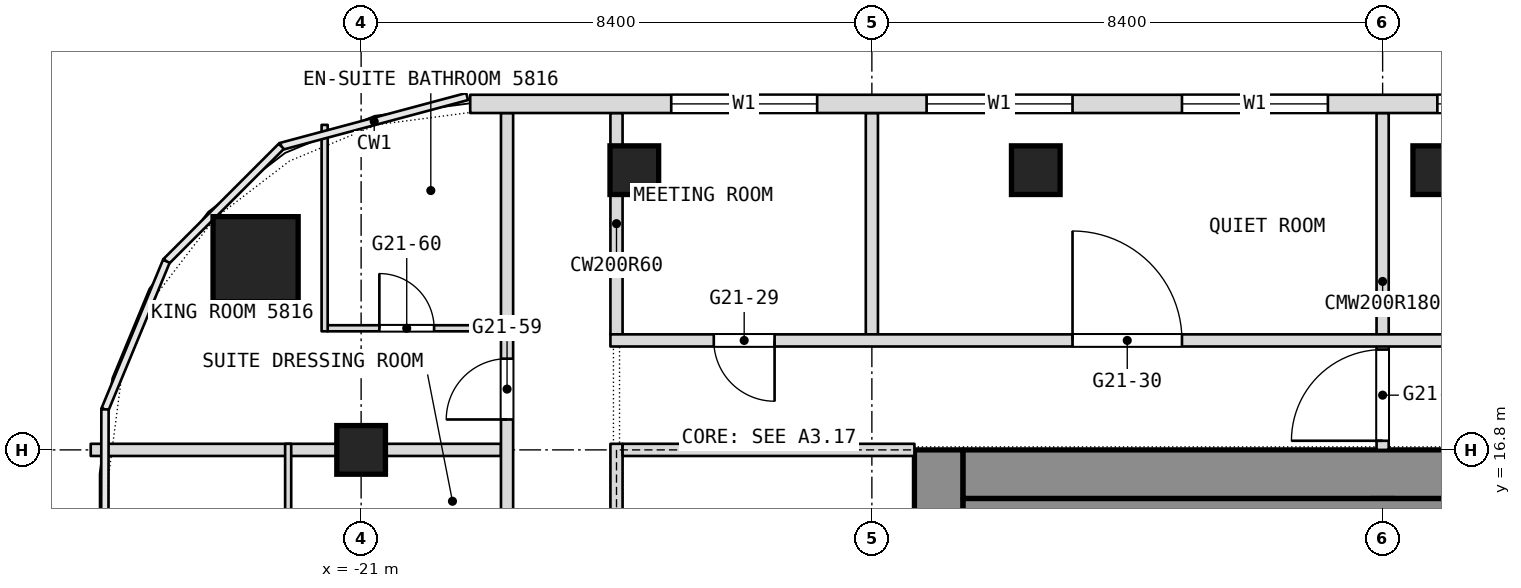
"""IFC4 building model, lengths in metres.
Left out: names, types, materials, properties, quantities, classifications, styles, units other than length and angle.
Written with IfcOpenShell. Run it as: python <this file> out.ifc"""

import sys

from ifc_helpers import new_model, si_unit, direction, frame, frame_2d, origin, origin_2d, place, context, subcontext, project, spatial, rectangle, extrude, element, fill, save


model = new_model("IFC4")
c1 = context("Model", 3, precision=1e-05, world=origin(), true_north=direction((0.0, 1.0)))
c2 = subcontext(c1, "Body", "Model", "MODEL_VIEW")
j1 = project(units=[si_unit("LENGTHUNIT", "METRE"), si_unit("PLANEANGLEUNIT", "RADIAN")], contexts=[c1])
p1 = place(None, origin())
s1 = spatial("IfcSite", under=j1, at=p1, CompositionType="ELEMENT")
p2 = place(p1, origin())
s2 = spatial("IfcBuilding", under=s1, at=p2, CompositionType="ELEMENT")
p3 = place(p2, frame((0.0, 0.0, 245.3)))
s3 = spatial("IfcBuildingStorey", under=s2, at=p3, CompositionType="ELEMENT", Elevation=245.3)
p4 = place(p3, frame((-11.5, 0.0, 0.0), z_axis=(0.0, 0.0, 1.0), x_axis=(0.0, 1.0, 0.0)))
e1 = element("IfcWall", 1, at=p4, inside=s3, PredefinedType="SHEAR", context=c2, shape_type="SweptSolid", body=[
    extrude(rectangle(XDim=16.8, YDim=0.8, at=frame_2d((8.4, 0.0))), origin(), (0.0, 0.0, 1.0), 3.6),
])
p5 = place(p4, frame((3.6, 0.0, 0.0)))
e2 = element("IfcOpeningElement", 2, at=p5, cuts=e1, PredefinedType="OPENING", context=c2, shape_type="SweptSolid", body=[
    extrude(rectangle(XDim=0.9, YDim=2.1, at=frame_2d((0.45, 1.05))), frame((0.0, 0.4, 0.0), z_axis=(0.0, -1.0, 0.0), x_axis=(1.0, 0.0, 0.0)), (0.0, 0.0, 1.0), 0.8),
])
p6 = place(p4, frame((6.825, 0.0, 0.0)))
e3 = element("IfcOpeningElement", 3, at=p6, cuts=e1, PredefinedType="OPENING", context=c2, shape_type="SweptSolid", body=[
    extrude(rectangle(XDim=1.2, YDim=2.1, at=frame_2d((0.6, 1.05))), frame((0.0, 0.4, 0.0), z_axis=(0.0, -1.0, 0.0), x_axis=(1.0, 0.0, 0.0)), (0.0, 0.0, 1.0), 0.8),
])
p7 = place(p4, frame((14.062, 0.0, 0.0)))
e4 = element("IfcOpeningElement", 4, at=p7, cuts=e1, PredefinedType="OPENING", context=c2, shape_type="SweptSolid", body=[
    extrude(rectangle(XDim=0.9, YDim=2.1, at=frame_2d((0.45, 1.05))), frame((0.0, 0.4, 0.0), z_axis=(0.0, -1.0, 0.0), x_axis=(1.0, 0.0, 0.0)), (0.0, 0.0, 1.0), 0.8),
])
p8 = place(p4, frame((11.438, 0.0, 0.0)))
e5 = element("IfcOpeningElement", 5, at=p8, cuts=e1, PredefinedType="OPENING", context=c2, shape_type="SweptSolid", body=[
    extrude(rectangle(XDim=0.9, YDim=2.1, at=frame_2d((0.45, 1.05))), frame((0.0, 0.4, 0.0), z_axis=(0.0, -1.0, 0.0), x_axis=(1.0, 0.0, 0.0)), (0.0, 0.0, 1.0), 0.8),
])
p9 = place(p4, frame((8.775, 0.0, 0.0)))
e6 = element("IfcOpeningElement", 6, at=p9, cuts=e1, PredefinedType="OPENING", context=c2, shape_type="SweptSolid", body=[
    extrude(rectangle(XDim=1.2, YDim=2.1, at=frame_2d((0.6, 1.05))), frame((0.0, 0.4, 0.0), z_axis=(0.0, -1.0, 0.0), x_axis=(1.0, 0.0, 0.0)), (0.0, 0.0, 1.0), 0.8),
])
p10 = place(p3, frame((-11.1, 16.4, 0.0), z_axis=(0.0, 0.0, 1.0), x_axis=(1.0, 0.0, 0.0)))
e7 = element("IfcWall", 7, at=p10, inside=s3, PredefinedType="SHEAR", context=c2, shape_type="SweptSolid", body=[
    extrude(rectangle(XDim=22.2, YDim=0.8, at=frame_2d((11.1, 0.0))), origin(), (0.0, 0.0, 1.0), 3.6),
])
p11 = place(p3, frame((-4.2, 0.8, 0.0), z_axis=(0.0, 0.0, 1.0), x_axis=(0.0, 1.0, 0.0)))
e8 = element("IfcWall", 8, at=p11, inside=s3, PredefinedType="SHEAR", context=c2, shape_type="SweptSolid", body=[
    extrude(rectangle(XDim=15.2, YDim=0.4, at=frame_2d((7.6, 0.0))), origin(), (0.0, 0.0, 1.0), 3.6),
])
p12 = place(p11, frame((8.5, 0.0, 0.0)))
e9 = element("IfcOpeningElement", 9, at=p12, cuts=e8, PredefinedType="OPENING", context=c2, shape_type="SweptSolid", body=[
    extrude(rectangle(XDim=1.2, YDim=2.1, at=frame_2d((0.6, 1.05))), frame((0.0, 0.2, 0.0), z_axis=(0.0, -1.0, 0.0), x_axis=(1.0, 0.0, 0.0)), (0.0, 0.0, 1.0), 0.4),
])
p13 = place(p3, frame((-22.736, 19.936, 0.0), z_axis=(0.0, 0.0, 1.0), x_axis=(1.0, 0.0, 0.0)))
e10 = element("IfcColumn", 10, at=p13, inside=s3, PredefinedType="COLUMN", context=c2, shape_type="SweptSolid", body=[
    extrude(rectangle(XDim=1.4, YDim=1.4, at=origin_2d()), origin(), (0.0, 0.0, 1.0), 3.6),
])
for number, where, z_axis, x_axis in (
    (11, (-21.0, 16.8, 0.0), (0.0, 0.0, 1.0), (1.0, 0.0, 0.0)),
    (12, (-16.507, 21.4, 0.0), (0.0, 0.0, 1.0), (1.0, 0.0, 0.0)),
    (13, (-9.904, 21.4, 0.0), (0.0, 0.0, 1.0), (1.0, 0.0, 0.0)),
    (14, (-3.302, 21.4, 0.0), (0.0, 0.0, 1.0), (1.0, 0.0, 0.0)),
):
    element("IfcColumn", number, at=place(p3, frame(where, z_axis=z_axis, x_axis=x_axis)), inside=s3, PredefinedType="COLUMN", context=c2, shape_type="SweptSolid", body=[
        extrude(rectangle(XDim=0.8, YDim=0.8, at=origin_2d()), origin(), (0.0, 0.0, 1.0), 3.6),
    ])
p14 = place(p3, frame((-4.2, 16.8, 0.0), z_axis=(0.0, 0.0, 1.0), x_axis=(0.0, 1.0, 0.0)))
e15 = element("IfcWall", 15, at=p14, inside=s3, PredefinedType="PARTITIONING", context=c2, shape_type="SweptSolid", body=[
    extrude(rectangle(XDim=5.54, YDim=0.2, at=frame_2d((2.77, 0.0))), origin(), (0.0, 0.0, 1.0), 3.34),
])
p15 = place(p14, frame((0.15, 0.0, 0.0)))
e16 = element("IfcOpeningElement", 16, at=p15, cuts=e15, PredefinedType="OPENING", context=c2, shape_type="SweptSolid", body=[
    extrude(rectangle(XDim=1.5, YDim=2.1, at=frame_2d((0.75, 1.05))), frame((0.0, 0.1, 0.0), z_axis=(0.0, -1.0, 0.0), x_axis=(1.0, 0.0, 0.0)), (0.0, 0.0, 1.0), 0.2),
])
for number, where, z_axis, x_axis in (
    (17, (-12.6, 18.7, 0.0), (0.0, 0.0, 1.0), (0.0, 1.0, 0.0)),
    (18, (-16.8, 18.7, 0.0), (0.0, 0.0, 1.0), (0.0, 1.0, 0.0)),
):
    element("IfcWall", number, at=place(p3, frame(where, z_axis=z_axis, x_axis=x_axis)), inside=s3, PredefinedType="PARTITIONING", context=c2, shape_type="SweptSolid", body=[
        extrude(rectangle(XDim=3.64, YDim=0.2, at=frame_2d((1.82, 0.0))), origin(), (0.0, 0.0, 1.0), 3.34),
    ])
p16 = place(p3, frame((-25.447, 16.8, 0.0), z_axis=(0.0, 0.0, 1.0), x_axis=(1.0, 0.0, 0.0)))
e19 = element("IfcWall", 19, at=p16, inside=s3, PredefinedType="PARTITIONING", context=c2, shape_type="SweptSolid", body=[
    extrude(rectangle(XDim=6.747, YDim=0.2, at=frame_2d((3.374, 0.0))), origin(), (0.0, 0.0, 1.0), 2.94),
])
p17 = place(p3, frame((-18.6, -26.751, 0.0), z_axis=(0.0, 0.0, 1.0), x_axis=(0.0, 1.0, 0.0)))
e20 = element("IfcWall", 20, at=p17, inside=s3, PredefinedType="PARTITIONING", context=c2, shape_type="SweptSolid", body=[
    extrude(rectangle(XDim=49.091, YDim=0.2, at=frame_2d((24.545, 0.0))), origin(), (0.0, 0.0, 1.0), 3.34),
])
p18 = place(p17, frame((4.576, 0.0, 0.0)))
e21 = element("IfcOpeningElement", 21, at=p18, cuts=e20, PredefinedType="OPENING", context=c2, shape_type="SweptSolid", body=[
    extrude(rectangle(XDim=1.1, YDim=2.1, at=frame_2d((0.55, 1.05))), frame((0.0, 0.1, 0.0), z_axis=(0.0, -1.0, 0.0), x_axis=(1.0, 0.0, 0.0)), (0.0, 0.0, 1.0), 0.2),
])
p19 = place(p17, frame((13.551, 0.0, 0.0)))
e22 = element("IfcOpeningElement", 22, at=p19, cuts=e20, PredefinedType="OPENING", context=c2, shape_type="SweptSolid", body=[
    extrude(rectangle(XDim=1.1, YDim=2.1, at=frame_2d((0.55, 1.05))), frame((0.0, 0.1, 0.0), z_axis=(0.0, -1.0, 0.0), x_axis=(1.0, 0.0, 0.0)), (0.0, 0.0, 1.0), 0.2),
])
p20 = place(p17, frame((22.051, 0.0, 0.0)))
e23 = element("IfcOpeningElement", 23, at=p20, cuts=e20, PredefinedType="OPENING", context=c2, shape_type="SweptSolid", body=[
    extrude(rectangle(XDim=1.1, YDim=2.1, at=frame_2d((0.55, 1.05))), frame((0.0, 0.1, 0.0), z_axis=(0.0, -1.0, 0.0), x_axis=(1.0, 0.0, 0.0)), (0.0, 0.0, 1.0), 0.2),
])
p21 = place(p17, frame((30.351, 0.0, 0.0)))
e24 = element("IfcOpeningElement", 24, at=p21, cuts=e20, PredefinedType="OPENING", context=c2, shape_type="SweptSolid", body=[
    extrude(rectangle(XDim=1.1, YDim=2.1, at=frame_2d((0.55, 1.05))), frame((0.0, 0.1, 0.0), z_axis=(0.0, -1.0, 0.0), x_axis=(1.0, 0.0, 0.0)), (0.0, 0.0, 1.0), 0.2),
])
p22 = place(p17, frame((38.851, 0.0, 0.0)))
e25 = element("IfcOpeningElement", 25, at=p22, cuts=e20, PredefinedType="OPENING", context=c2, shape_type="SweptSolid", body=[
    extrude(rectangle(XDim=1.1, YDim=2.1, at=frame_2d((0.55, 1.05))), frame((0.0, 0.1, 0.0), z_axis=(0.0, -1.0, 0.0), x_axis=(1.0, 0.0, 0.0)), (0.0, 0.0, 1.0), 0.2),
])
p23 = place(p17, frame((44.051, 0.0, 0.0)))
e26 = element("IfcOpeningElement", 26, at=p23, cuts=e20, PredefinedType="OPENING", context=c2, shape_type="SweptSolid", body=[
    extrude(rectangle(XDim=1.0, YDim=2.1, at=frame_2d((0.5, 1.05))), frame((0.0, 0.1, 0.0), z_axis=(0.0, -1.0, 0.0), x_axis=(1.0, 0.0, 0.0)), (0.0, 0.0, 1.0), 0.2),
])
p24 = place(p3, frame((-16.9, 18.6, 0.0), z_axis=(0.0, 0.0, 1.0), x_axis=(1.0, 0.0, 0.0)))
e27 = element("IfcWall", 27, at=p24, inside=s3, PredefinedType="PARTITIONING", context=c2, shape_type="SweptSolid", body=[
    extrude(rectangle(XDim=33.8, YDim=0.2, at=frame_2d((16.9, 0.0))), origin(), (0.0, 0.0, 1.0), 3.34),
])
p25 = place(p24, frame((1.7, 0.0, 0.0)))
e28 = element("IfcOpeningElement", 28, at=p25, cuts=e27, PredefinedType="OPENING", context=c2, shape_type="SweptSolid", body=[
    extrude(rectangle(XDim=1.0, YDim=2.1, at=frame_2d((0.5, 1.05))), frame((0.0, 0.1, 0.0), z_axis=(0.0, -1.0, 0.0), x_axis=(1.0, 0.0, 0.0)), (0.0, 0.0, 1.0), 0.2),
])
p26 = place(p24, frame((7.6, 0.0, 0.0)))
e29 = element("IfcOpeningElement", 29, at=p26, cuts=e27, PredefinedType="OPENING", context=c2, shape_type="SweptSolid", body=[
    extrude(rectangle(XDim=1.8, YDim=2.1, at=frame_2d((0.9, 1.05))), frame((0.0, 0.1, 0.0), z_axis=(0.0, -1.0, 0.0), x_axis=(1.0, 0.0, 0.0)), (0.0, 0.0, 1.0), 0.2),
])
p27 = place(p24, frame((16.0, 0.0, 0.0)))
e30 = element("IfcOpeningElement", 30, at=p27, cuts=e27, PredefinedType="OPENING", context=c2, shape_type="SweptSolid", body=[
    extrude(rectangle(XDim=1.8, YDim=2.1, at=frame_2d((0.9, 1.05))), frame((0.0, 0.1, 0.0), z_axis=(0.0, -1.0, 0.0), x_axis=(1.0, 0.0, 0.0)), (0.0, 0.0, 1.0), 0.2),
])
p28 = place(p24, frame((31.1, 0.0, 0.0)))
e31 = element("IfcOpeningElement", 31, at=p28, cuts=e27, PredefinedType="OPENING", context=c2, shape_type="SweptSolid", body=[
    extrude(rectangle(XDim=1.0, YDim=2.1, at=frame_2d((0.5, 1.05))), frame((0.0, 0.1, 0.0), z_axis=(0.0, -1.0, 0.0), x_axis=(1.0, 0.0, 0.0)), (0.0, 0.0, 1.0), 0.2),
])
p29 = place(p24, frame((22.7, 0.0, 0.0)))
e32 = element("IfcOpeningElement", 32, at=p29, cuts=e27, PredefinedType="OPENING", context=c2, shape_type="SweptSolid", body=[
    extrude(rectangle(XDim=1.0, YDim=2.1, at=frame_2d((0.5, 1.05))), frame((0.0, 0.1, 0.0), z_axis=(0.0, -1.0, 0.0), x_axis=(1.0, 0.0, 0.0)), (0.0, 0.0, 1.0), 0.2),
])
p30 = place(p24, frame((26.9, 0.0, 0.0)))
e33 = element("IfcOpeningElement", 33, at=p30, cuts=e27, PredefinedType="OPENING", context=c2, shape_type="SweptSolid", body=[
    extrude(rectangle(XDim=1.0, YDim=2.1, at=frame_2d((0.5, 1.05))), frame((0.0, 0.1, 0.0), z_axis=(0.0, -1.0, 0.0), x_axis=(1.0, 0.0, 0.0)), (0.0, 0.0, 1.0), 0.2),
])
p31 = place(p3, frame((-21.55, 18.8, 0.0), z_axis=(0.0, 0.0, 1.0), x_axis=(1.0, 0.0, 0.0)))
e34 = element("IfcWall", 34, at=p31, inside=s3, PredefinedType="PARTITIONING", context=c2, shape_type="SweptSolid", body=[
    extrude(rectangle(XDim=2.85, YDim=0.1, at=frame_2d((1.425, 0.0))), origin(), (0.0, 0.0, 1.0), 3.34),
])
p32 = place(p31, frame((0.85, 0.0, 0.0)))
e35 = element("IfcOpeningElement", 35, at=p32, cuts=e34, PredefinedType="OPENING", context=c2, shape_type="SweptSolid", body=[
    extrude(rectangle(XDim=0.9, YDim=2.1, at=frame_2d((0.45, 1.05))), frame((0.0, 0.05, 0.0), z_axis=(0.0, -1.0, 0.0), x_axis=(1.0, 0.0, 0.0)), (0.0, 0.0, 1.0), 0.1),
])
p33 = place(p3, frame((-21.6, 18.75, 0.0), z_axis=(0.0, 0.0, 1.0), x_axis=(0.0, 1.0, 0.0)))
e36 = element("IfcWall", 36, at=p33, inside=s3, PredefinedType="PARTITIONING", context=c2, shape_type="SweptSolid", body=[
    extrude(rectangle(XDim=3.395, YDim=0.1, at=frame_2d((1.698, 0.0))), origin(), (0.0, 0.0, 1.0), 3.34),
])
p34 = place(p3, frame((-22.2, 14.35, 0.0), z_axis=(0.0, 0.0, 1.0), x_axis=(0.0, 1.0, 0.0)))
e37 = element("IfcWall", 37, at=p34, inside=s3, PredefinedType="PARTITIONING", context=c2, shape_type="SweptSolid", body=[
    extrude(rectangle(XDim=2.55, YDim=0.1, at=frame_2d((1.275, 0.0))), origin(), (0.0, 0.0, 1.0), 3.34),
])
p35 = place(p3, frame((19.206, 22.49, 0.0), z_axis=(0.0, 0.0, 1.0), x_axis=(-1.0, 0.0, 0.0)))
e38 = element("IfcWall", 38, at=p35, inside=s3, PredefinedType="NOTDEFINED", context=c2, shape_type="SweptSolid", body=[
    extrude(rectangle(XDim=38.412, YDim=0.3, at=frame_2d((19.206, 0.0))), origin(), (0.0, 0.0, 1.0), 3.6),
])
p36 = place(p35, frame((3.306, 0.0, 0.9)))
e39 = element("IfcOpeningElement", 39, at=p36, cuts=e38, PredefinedType="OPENING", context=c2, shape_type="SweptSolid", body=[
    extrude(rectangle(XDim=2.4, YDim=2.1, at=frame_2d((1.2, 1.05))), frame((0.0, 0.15, 0.0), z_axis=(0.0, -1.0, 0.0), x_axis=(1.0, 0.0, 0.0)), (0.0, 0.0, 1.0), 0.3),
])
p37 = place(p35, frame((7.506, 0.0, 0.9)))
e40 = element("IfcOpeningElement", 40, at=p37, cuts=e38, PredefinedType="OPENING", context=c2, shape_type="SweptSolid", body=[
    extrude(rectangle(XDim=2.4, YDim=2.1, at=frame_2d((1.2, 1.05))), frame((0.0, 0.15, 0.0), z_axis=(0.0, -1.0, 0.0), x_axis=(1.0, 0.0, 0.0)), (0.0, 0.0, 1.0), 0.3),
])
p38 = place(p35, frame((11.706, 0.0, 0.9)))
e41 = element("IfcOpeningElement", 41, at=p38, cuts=e38, PredefinedType="OPENING", context=c2, shape_type="SweptSolid", body=[
    extrude(rectangle(XDim=2.4, YDim=2.1, at=frame_2d((1.2, 1.05))), frame((0.0, 0.15, 0.0), z_axis=(0.0, -1.0, 0.0), x_axis=(1.0, 0.0, 0.0)), (0.0, 0.0, 1.0), 0.3),
])
p39 = place(p35, frame((15.906, 0.0, 0.9)))
e42 = element("IfcOpeningElement", 42, at=p39, cuts=e38, PredefinedType="OPENING", context=c2, shape_type="SweptSolid", body=[
    extrude(rectangle(XDim=2.4, YDim=2.1, at=frame_2d((1.2, 1.05))), frame((0.0, 0.15, 0.0), z_axis=(0.0, -1.0, 0.0), x_axis=(1.0, 0.0, 0.0)), (0.0, 0.0, 1.0), 0.3),
])
p40 = place(p35, frame((20.106, 0.0, 0.9)))
e43 = element("IfcOpeningElement", 43, at=p40, cuts=e38, PredefinedType="OPENING", context=c2, shape_type="SweptSolid", body=[
    extrude(rectangle(XDim=2.4, YDim=2.1, at=frame_2d((1.2, 1.05))), frame((0.0, 0.15, 0.0), z_axis=(0.0, -1.0, 0.0), x_axis=(1.0, 0.0, 0.0)), (0.0, 0.0, 1.0), 0.3),
])
p41 = place(p35, frame((24.306, 0.0, 0.9)))
e44 = element("IfcOpeningElement", 44, at=p41, cuts=e38, PredefinedType="OPENING", context=c2, shape_type="SweptSolid", body=[
    extrude(rectangle(XDim=2.4, YDim=2.1, at=frame_2d((1.2, 1.05))), frame((0.0, 0.15, 0.0), z_axis=(0.0, -1.0, 0.0), x_axis=(1.0, 0.0, 0.0)), (0.0, 0.0, 1.0), 0.3),
])
p42 = place(p35, frame((28.506, 0.0, 0.9)))
e45 = element("IfcOpeningElement", 45, at=p42, cuts=e38, PredefinedType="OPENING", context=c2, shape_type="SweptSolid", body=[
    extrude(rectangle(XDim=2.4, YDim=2.1, at=frame_2d((1.2, 1.05))), frame((0.0, 0.15, 0.0), z_axis=(0.0, -1.0, 0.0), x_axis=(1.0, 0.0, 0.0)), (0.0, 0.0, 1.0), 0.3),
])
p43 = place(p35, frame((32.706, 0.0, 0.9)))
e46 = element("IfcOpeningElement", 46, at=p43, cuts=e38, PredefinedType="OPENING", context=c2, shape_type="SweptSolid", body=[
    extrude(rectangle(XDim=2.4, YDim=2.1, at=frame_2d((1.2, 1.05))), frame((0.0, 0.15, 0.0), z_axis=(0.0, -1.0, 0.0), x_axis=(1.0, 0.0, 0.0)), (0.0, 0.0, 1.0), 0.3),
])
p44 = place(p3, frame((-11.1, 15.65, 0.0), z_axis=(0.0, 0.0, 1.0), x_axis=(1.0, 0.0, 0.0)))
e47 = element("IfcWall", 47, at=p44, inside=s3, PredefinedType="PARTITIONING", context=c2, shape_type="SweptSolid", body=[
    extrude(rectangle(XDim=22.2, YDim=0.7, at=frame_2d((11.1, 0.0))), origin(), (0.0, 0.0, 1.0), 3.34),
])
p45 = place(p3, frame((-16.8, -0.1, 0.0), z_axis=(0.0, 0.0, 1.0), x_axis=(0.0, 1.0, 0.0)))
e48 = element("IfcWall", 48, at=p45, inside=s3, PredefinedType="PARTITIONING", context=c2, shape_type="SweptSolid", body=[
    extrude(rectangle(XDim=17.0, YDim=0.2, at=frame_2d((8.5, 0.0))), origin(), (0.0, 0.0, 1.0), 3.34),
])
p46 = place(p45, frame((2.2, 0.0, 0.0)))
e49 = element("IfcOpeningElement", 49, at=p46, cuts=e48, PredefinedType="OPENING", context=c2, shape_type="SweptSolid", body=[
    extrude(rectangle(XDim=1.8, YDim=2.1, at=frame_2d((0.9, 1.05))), frame((0.0, 0.1, 0.0), z_axis=(0.0, -1.0, 0.0), x_axis=(1.0, 0.0, 0.0)), (0.0, 0.0, 1.0), 0.2),
])
p47 = place(p45, frame((13.0, 0.0, 0.0)))
e50 = element("IfcOpeningElement", 50, at=p47, cuts=e48, PredefinedType="OPENING", context=c2, shape_type="SweptSolid", body=[
    extrude(rectangle(XDim=1.8, YDim=2.1, at=frame_2d((0.9, 1.05))), frame((0.0, 0.1, 0.0), z_axis=(0.0, -1.0, 0.0), x_axis=(1.0, 0.0, 0.0)), (0.0, 0.0, 1.0), 0.2),
])
p48 = place(p3, frame((-16.7, 16.8, 0.0), z_axis=(0.0, 0.0, 1.0), x_axis=(1.0, 0.0, 0.0)))
e51 = element("IfcWall", 51, at=p48, inside=s3, PredefinedType="PARTITIONING", context=c2, shape_type="SweptSolid", body=[
    extrude(rectangle(XDim=4.8, YDim=0.2, at=frame_2d((2.4, 0.0))), origin(), (0.0, 0.0, 1.0), 2.94),
])
p49 = place(p23, origin())
e52 = element("IfcDoor", 52, at=p49, inside=s3, OperationType="SINGLE_SWING_RIGHT", PredefinedType="DOOR", context=c2, shape_type="SweptSolid", body=[
    extrude(rectangle(XDim=1.0, YDim=2.1, at=frame_2d((0.5, 1.05))), frame((0.0, 0.025, 0.0), z_axis=(0.0, -1.0, 0.0), x_axis=(1.0, 0.0, 0.0)), (0.0, 0.0, 1.0), 0.05),
])
fill(e26, e52)
p50 = place(p25, origin())
e53 = element("IfcDoor", 53, at=p50, inside=s3, OperationType="SINGLE_SWING_LEFT", PredefinedType="DOOR", context=c2, shape_type="SweptSolid", body=[
    extrude(rectangle(XDim=1.0, YDim=2.1, at=frame_2d((0.5, 1.05))), frame((0.0, 0.025, 0.0), z_axis=(0.0, -1.0, 0.0), x_axis=(1.0, 0.0, 0.0)), (0.0, 0.0, 1.0), 0.05),
])
fill(e28, e53)
p51 = place(p26, origin())
e54 = element("IfcDoor", 54, at=p51, inside=s3, OperationType="DOUBLE_DOOR_SINGLE_SWING", PredefinedType="DOOR", context=c2, shape_type="SweptSolid", body=[
    extrude(rectangle(XDim=1.8, YDim=2.1, at=frame_2d((0.9, 1.05))), frame((0.0, 0.025, 0.0), z_axis=(0.0, -1.0, 0.0), x_axis=(1.0, 0.0, 0.0)), (0.0, 0.0, 1.0), 0.05),
])
fill(e29, e54)
p52 = place(p32, origin())
e55 = element("IfcDoor", 55, at=p52, inside=s3, OperationType="SINGLE_SWING_LEFT", PredefinedType="DOOR", context=c2, shape_type="SweptSolid", body=[
    extrude(rectangle(XDim=0.9, YDim=2.1, at=frame_2d((0.45, 1.05))), frame((0.0, 0.025, 0.0), z_axis=(0.0, -1.0, 0.0), x_axis=(1.0, 0.0, 0.0)), (0.0, 0.0, 1.0), 0.05),
])
fill(e35, e55)
p53 = place(p40, origin())
e56 = element("IfcWindow", 56, at=p53, inside=s3, PartitioningType="SINGLE_PANEL", PredefinedType="WINDOW", context=c2, shape_type="SweptSolid", body=[
    extrude(rectangle(XDim=2.4, YDim=2.1, at=frame_2d((1.2, 1.05))), frame((0.0, 0.03, 0.0), z_axis=(0.0, -1.0, 0.0), x_axis=(1.0, 0.0, 0.0)), (0.0, 0.0, 1.0), 0.06),
])
fill(e43, e56)
p54 = place(p41, origin())
e57 = element("IfcWindow", 57, at=p54, inside=s3, PartitioningType="SINGLE_PANEL", PredefinedType="WINDOW", context=c2, shape_type="SweptSolid", body=[
    extrude(rectangle(XDim=2.4, YDim=2.1, at=frame_2d((1.2, 1.05))), frame((0.0, 0.03, 0.0), z_axis=(0.0, -1.0, 0.0), x_axis=(1.0, 0.0, 0.0)), (0.0, 0.0, 1.0), 0.06),
])
fill(e44, e57)
p55 = place(p42, origin())
e58 = element("IfcWindow", 58, at=p55, inside=s3, PartitioningType="SINGLE_PANEL", PredefinedType="WINDOW", context=c2, shape_type="SweptSolid", body=[
    extrude(rectangle(XDim=2.4, YDim=2.1, at=frame_2d((1.2, 1.05))), frame((0.0, 0.03, 0.0), z_axis=(0.0, -1.0, 0.0), x_axis=(1.0, 0.0, 0.0)), (0.0, 0.0, 1.0), 0.06),
])
fill(e45, e58)
p56 = place(p43, origin())
e59 = element("IfcWindow", 59, at=p56, inside=s3, PartitioningType="SINGLE_PANEL", PredefinedType="WINDOW", context=c2, shape_type="SweptSolid", body=[
    extrude(rectangle(XDim=2.4, YDim=2.1, at=frame_2d((1.2, 1.05))), frame((0.0, 0.03, 0.0), z_axis=(0.0, -1.0, 0.0), x_axis=(1.0, 0.0, 0.0)), (0.0, 0.0, 1.0), 0.06),
])
fill(e46, e59)
p57 = place(p15, origin())
e60 = element("IfcDoor", 60, at=p57, inside=s3, OperationType="DOUBLE_DOOR_DOUBLE_SWING", PredefinedType="DOOR", context=c2, shape_type="SweptSolid", body=[
    extrude(rectangle(XDim=1.5, YDim=2.1, at=frame_2d((0.75, 1.05))), frame((0.0, 0.025, 0.0), z_axis=(0.0, -1.0, 0.0), x_axis=(1.0, 0.0, 0.0)), (0.0, 0.0, 1.0), 0.05),
])
fill(e16, e60)
save(model, sys.argv[1])
